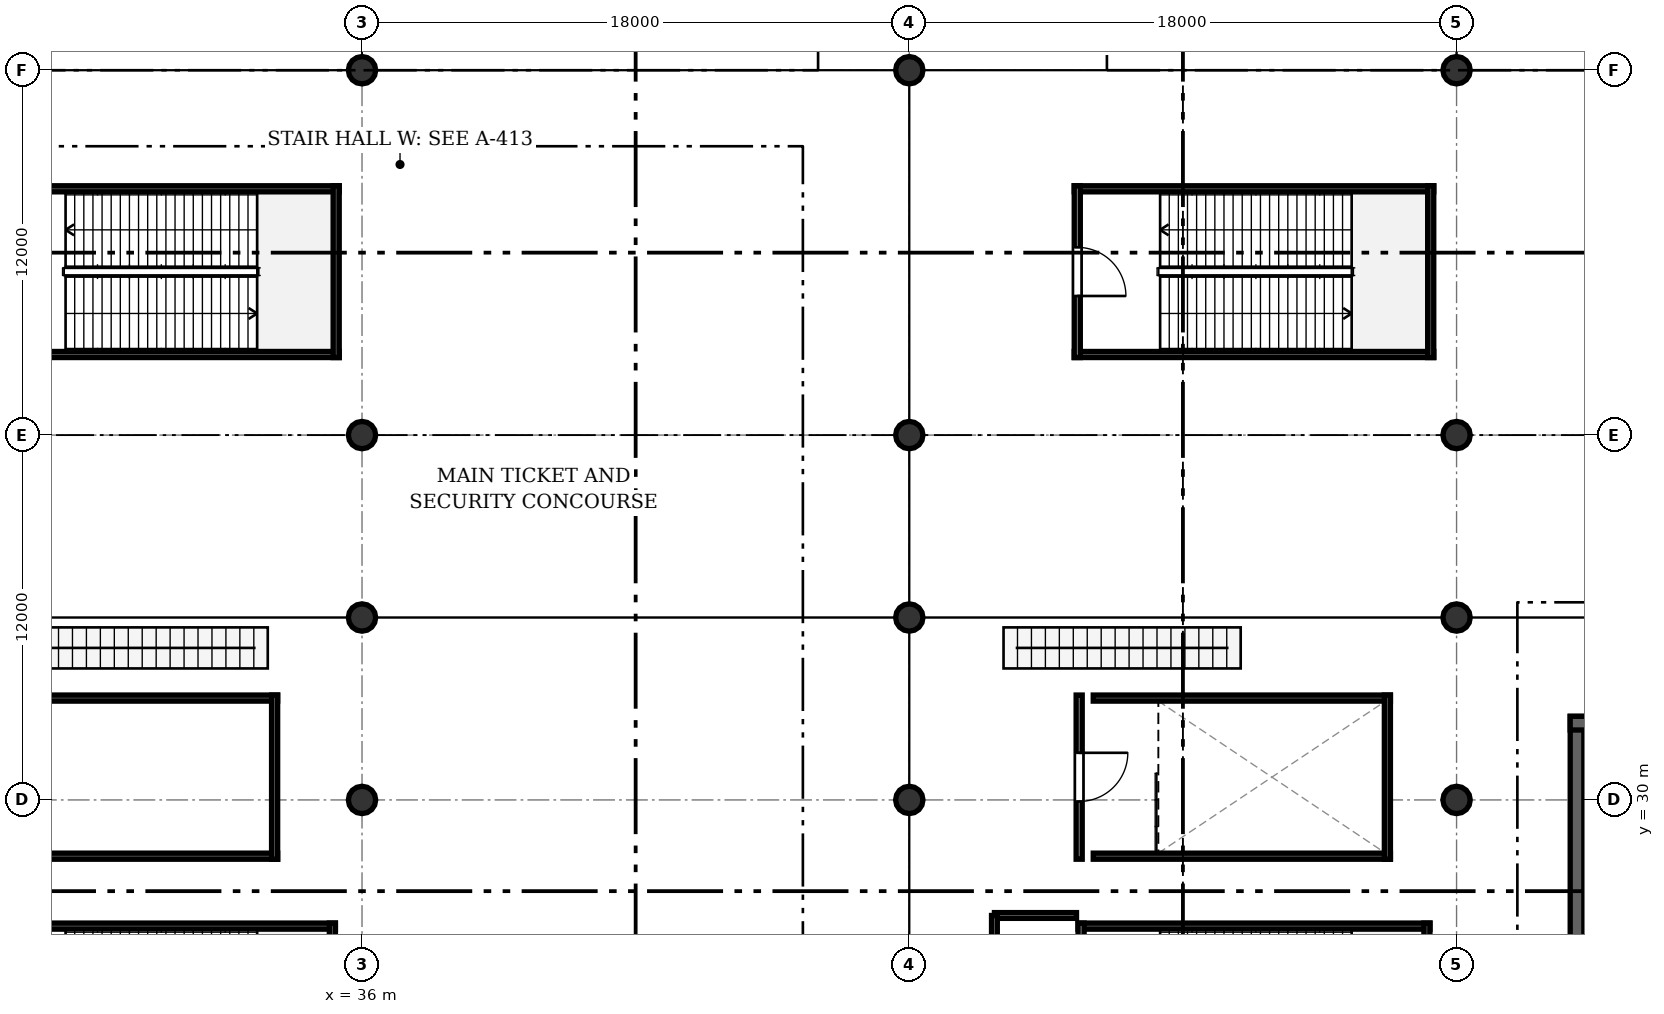
"""IFC4 building model, lengths in metres.
Left out: names, types, materials, properties, quantities, classifications, styles, units other than length and angle.
Written with IfcOpenShell. Run it as: python <this file> out.ifc"""

import sys

from ifc_helpers import new_model, si_unit, direction, frame, frame_2d, origin, origin_2d, place, context, subcontext, project, spatial, rectangle, circle, extrude, element, fill, save


model = new_model("IFC4")
c1 = context("Model", 3, precision=1e-05, world=origin(), true_north=direction((0.0, 1.0)))
c2 = subcontext(c1, "Body", "Model", "MODEL_VIEW")
j1 = project(units=[si_unit("LENGTHUNIT", "METRE"), si_unit("PLANEANGLEUNIT", "RADIAN")], contexts=[c1])
p1 = place(None, origin())
s1 = spatial("IfcSite", under=j1, at=p1, CompositionType="ELEMENT")
p2 = place(p1, origin())
s2 = spatial("IfcBuilding", under=s1, at=p2, CompositionType="ELEMENT")
p3 = place(p2, origin())
s3 = spatial("IfcBuildingStorey", under=s2, at=p3, CompositionType="ELEMENT", Elevation=0.0)
for number, where, z_axis, x_axis in (
    (1, (36.0, 30.0, 0.0), (0.0, 0.0, 1.0), (1.0, 0.0, 0.0)),
    (2, (36.0, 36.0, 0.0), (0.0, 0.0, 1.0), (1.0, 0.0, 0.0)),
    (3, (36.0, 42.0, 0.0), (0.0, 0.0, 1.0), (1.0, 0.0, 0.0)),
    (4, (36.0, 54.0, 0.0), (0.0, 0.0, 1.0), (1.0, 0.0, 0.0)),
    (5, (54.0, 30.0, 0.0), (0.0, 0.0, 1.0), (1.0, 0.0, 0.0)),
    (6, (54.0, 36.0, 0.0), (0.0, 0.0, 1.0), (1.0, 0.0, 0.0)),
    (7, (54.0, 42.0, 0.0), (0.0, 0.0, 1.0), (1.0, 0.0, 0.0)),
    (8, (54.0, 54.0, 0.0), (0.0, 0.0, 1.0), (1.0, 0.0, 0.0)),
    (9, (72.0, 30.0, 0.0), (0.0, 0.0, 1.0), (1.0, 0.0, 0.0)),
    (10, (72.0, 36.0, 0.0), (0.0, 0.0, 1.0), (1.0, 0.0, 0.0)),
    (11, (72.0, 42.0, 0.0), (0.0, 0.0, 1.0), (1.0, 0.0, 0.0)),
    (12, (72.0, 54.0, 0.0), (0.0, 0.0, 1.0), (1.0, 0.0, 0.0)),
):
    element("IfcColumn", number, at=place(p3, frame(where, z_axis=z_axis, x_axis=x_axis)), inside=s3, PredefinedType="COLUMN", context=c2, shape_type="SweptSolid", body=[
        extrude(circle(Radius=0.45, at=origin_2d()), origin(), (0.0, 0.0, 1.0), 6.6),
    ])
p4 = place(p3, frame((75.962, 32.75, 0.0), z_axis=(0.0, 0.0, 1.0), x_axis=(0.0, -1.0, 0.0)))
e13 = element("IfcWall", 13, at=p4, inside=s3, PredefinedType="SHEAR", context=c2, shape_type="SweptSolid", body=[
    extrude(rectangle(XDim=11.075, YDim=0.45, at=frame_2d((5.538, 0.0))), origin(), (0.0, 0.0, 1.0), 6.32),
])
p5 = place(p3, frame((80.637, 32.525, 0.0), z_axis=(0.0, 0.0, 1.0), x_axis=(-1.0, 0.0, 0.0)))
e14 = element("IfcWall", 14, at=p5, inside=s3, PredefinedType="SHEAR", context=c2, shape_type="SweptSolid", body=[
    extrude(rectangle(XDim=4.9, YDim=0.45, at=frame_2d((2.45, 0.0))), origin(), (0.0, 0.0, 1.0), 6.32),
])
p6 = place(p3, frame((35.125, 25.85, 0.0), z_axis=(0.0, 0.0, 1.0), x_axis=(-1.0, 0.0, 0.0)))
e15 = element("IfcWall", 15, at=p6, inside=s3, PredefinedType="SOLIDWALL", context=c2, shape_type="SweptSolid", body=[
    extrude(rectangle(XDim=11.575, YDim=0.2, at=frame_2d((5.788, 0.0))), origin(), (0.0, 0.0, 1.0), 6.32),
])
p7 = place(p3, frame((35.025, 20.55, 0.0), z_axis=(0.0, 0.0, 1.0), x_axis=(0.0, 1.0, 0.0)))
e16 = element("IfcWall", 16, at=p7, inside=s3, PredefinedType="SOLIDWALL", context=c2, shape_type="SweptSolid", body=[
    extrude(rectangle(XDim=5.4, YDim=0.2, at=frame_2d((2.7, 0.0))), origin(), (0.0, 0.0, 1.0), 6.32),
])
p8 = place(p3, frame((71.125, 25.85, 0.0), z_axis=(0.0, 0.0, 1.0), x_axis=(-1.0, 0.0, 0.0)))
e17 = element("IfcWall", 17, at=p8, inside=s3, PredefinedType="SOLIDWALL", context=c2, shape_type="SweptSolid", body=[
    extrude(rectangle(XDim=11.575, YDim=0.2, at=frame_2d((5.788, 0.0))), origin(), (0.0, 0.0, 1.0), 6.32),
])
p9 = place(p3, frame((71.025, 20.55, 0.0), z_axis=(0.0, 0.0, 1.0), x_axis=(0.0, 1.0, 0.0)))
e18 = element("IfcWall", 18, at=p9, inside=s3, PredefinedType="SOLIDWALL", context=c2, shape_type="SweptSolid", body=[
    extrude(rectangle(XDim=5.4, YDim=0.2, at=frame_2d((2.7, 0.0))), origin(), (0.0, 0.0, 1.0), 6.32),
])
p10 = place(p3, frame((59.65, 25.95, 0.0), z_axis=(0.0, 0.0, 1.0), x_axis=(0.0, -1.0, 0.0)))
e19 = element("IfcWall", 19, at=p10, inside=s3, PredefinedType="SOLIDWALL", context=c2, shape_type="SweptSolid", body=[
    extrude(rectangle(XDim=5.4, YDim=0.2, at=frame_2d((2.7, 0.0))), origin(), (0.0, 0.0, 1.0), 4.4),
])
p11 = place(p10, frame((1.9, 0.0, 0.0)))
e20 = element("IfcOpeningElement", 20, at=p11, cuts=e19, PredefinedType="OPENING", context=c2, shape_type="SweptSolid", body=[
    extrude(rectangle(XDim=1.6, YDim=2.15, at=frame_2d((0.8, 1.075))), frame((0.0, 0.11, 0.0), z_axis=(0.0, -1.0, 0.0), x_axis=(1.0, 0.0, 0.0)), (0.0, 0.0, 1.0), 0.22),
])
for number, where, z_axis, x_axis in (
    (21, (23.425, 44.65, 0.0), (0.0, 0.0, 1.0), (1.0, 0.0, 0.0)),
    (22, (35.25, 50.1, 0.0), (0.0, 0.0, 1.0), (-1.0, 0.0, 0.0)),
):
    element("IfcWall", number, at=place(p3, frame(where, z_axis=z_axis, x_axis=x_axis)), inside=s3, PredefinedType="SOLIDWALL", context=c2, shape_type="SweptSolid", body=[
        extrude(rectangle(XDim=11.825, YDim=0.2, at=frame_2d((5.913, 0.0))), origin(), (0.0, 0.0, 1.0), 6.32),
    ])
p12 = place(p3, frame((35.15, 44.55, 0.0), z_axis=(0.0, 0.0, 1.0), x_axis=(0.0, 1.0, 0.0)))
e23 = element("IfcWall", 23, at=p12, inside=s3, PredefinedType="SOLIDWALL", context=c2, shape_type="SweptSolid", body=[
    extrude(rectangle(XDim=5.65, YDim=0.2, at=frame_2d((2.825, 0.0))), origin(), (0.0, 0.0, 1.0), 6.32),
])
for number, where, z_axis, x_axis in (
    (24, (59.425, 44.65, 0.0), (0.0, 0.0, 1.0), (1.0, 0.0, 0.0)),
    (25, (71.25, 50.1, 0.0), (0.0, 0.0, 1.0), (-1.0, 0.0, 0.0)),
):
    element("IfcWall", number, at=place(p3, frame(where, z_axis=z_axis, x_axis=x_axis)), inside=s3, PredefinedType="SOLIDWALL", context=c2, shape_type="SweptSolid", body=[
        extrude(rectangle(XDim=11.825, YDim=0.2, at=frame_2d((5.913, 0.0))), origin(), (0.0, 0.0, 1.0), 6.32),
    ])
p13 = place(p3, frame((71.15, 44.55, 0.0), z_axis=(0.0, 0.0, 1.0), x_axis=(0.0, 1.0, 0.0)))
e26 = element("IfcWall", 26, at=p13, inside=s3, PredefinedType="SOLIDWALL", context=c2, shape_type="SweptSolid", body=[
    extrude(rectangle(XDim=5.65, YDim=0.2, at=frame_2d((2.825, 0.0))), origin(), (0.0, 0.0, 1.0), 6.32),
])
p14 = place(p3, frame((59.525, 50.2, 0.0), z_axis=(0.0, 0.0, 1.0), x_axis=(0.0, -1.0, 0.0)))
e27 = element("IfcWall", 27, at=p14, inside=s3, PredefinedType="SOLIDWALL", context=c2, shape_type="SweptSolid", body=[
    extrude(rectangle(XDim=5.65, YDim=0.2, at=frame_2d((2.825, 0.0))), origin(), (0.0, 0.0, 1.0), 4.4),
])
p15 = place(p14, frame((2.025, 0.0, 0.0)))
e28 = element("IfcOpeningElement", 28, at=p15, cuts=e27, PredefinedType="OPENING", context=c2, shape_type="SweptSolid", body=[
    extrude(rectangle(XDim=1.6, YDim=2.15, at=frame_2d((0.8, 1.075))), frame((0.0, 0.11, 0.0), z_axis=(0.0, -1.0, 0.0), x_axis=(1.0, 0.0, 0.0)), (0.0, 0.0, 1.0), 0.22),
])
for number, where, z_axis, x_axis in (
    (29, (24.05, 28.15, 0.0), (0.0, 0.0, 1.0), (1.0, 0.0, 0.0)),
    (30, (33.225, 33.35, 0.0), (0.0, 0.0, 1.0), (-1.0, 0.0, 0.0)),
):
    element("IfcWall", number, at=place(p3, frame(where, z_axis=z_axis, x_axis=x_axis)), inside=s3, PredefinedType="SOLIDWALL", context=c2, shape_type="SweptSolid", body=[
        extrude(rectangle(XDim=9.175, YDim=0.2, at=frame_2d((4.587, 0.0))), origin(), (0.0, 0.0, 1.0), 6.32),
    ])
p16 = place(p3, frame((33.125, 28.05, 0.0), z_axis=(0.0, 0.0, 1.0), x_axis=(0.0, 1.0, 0.0)))
e31 = element("IfcWall", 31, at=p16, inside=s3, PredefinedType="SOLIDWALL", context=c2, shape_type="SweptSolid", body=[
    extrude(rectangle(XDim=5.4, YDim=0.2, at=frame_2d((2.7, 0.0))), origin(), (0.0, 0.0, 1.0), 6.32),
])
for number, where, z_axis, x_axis in (
    (32, (60.05, 28.15, 0.0), (0.0, 0.0, 1.0), (1.0, 0.0, 0.0)),
    (33, (69.825, 33.35, 0.0), (0.0, 0.0, 1.0), (-1.0, 0.0, 0.0)),
):
    element("IfcWall", number, at=place(p3, frame(where, z_axis=z_axis, x_axis=x_axis)), inside=s3, PredefinedType="SOLIDWALL", context=c2, shape_type="SweptSolid", body=[
        extrude(rectangle(XDim=9.775, YDim=0.2, at=frame_2d((4.887, 0.0))), origin(), (0.0, 0.0, 1.0), 6.32),
    ])
p17 = place(p3, frame((69.725, 28.05, 0.0), z_axis=(0.0, 0.0, 1.0), x_axis=(0.0, 1.0, 0.0)))
e34 = element("IfcWall", 34, at=p17, inside=s3, PredefinedType="SOLIDWALL", context=c2, shape_type="SweptSolid", body=[
    extrude(rectangle(XDim=5.4, YDim=0.2, at=frame_2d((2.7, 0.0))), origin(), (0.0, 0.0, 1.0), 6.32),
])
p18 = place(p3, frame((59.587, 33.45, 0.0), z_axis=(0.0, 0.0, 1.0), x_axis=(0.0, -1.0, 0.0)))
e35 = element("IfcWall", 35, at=p18, inside=s3, PredefinedType="SOLIDWALL", context=c2, shape_type="SweptSolid", body=[
    extrude(rectangle(XDim=5.4, YDim=0.2, at=frame_2d((2.7, 0.0))), origin(), (0.0, 0.0, 1.0), 4.4),
])
p19 = place(p18, frame((1.9, 0.0, 0.0)))
e36 = element("IfcOpeningElement", 36, at=p19, cuts=e35, PredefinedType="OPENING", context=c2, shape_type="SweptSolid", body=[
    extrude(rectangle(XDim=1.6, YDim=2.15, at=frame_2d((0.8, 1.075))), frame((0.0, 0.11, 0.0), z_axis=(0.0, -1.0, 0.0), x_axis=(1.0, 0.0, 0.0)), (0.0, 0.0, 1.0), 0.22),
])
p20 = place(p3, frame((56.8, 26.2, 0.0), z_axis=(0.0, 0.0, 1.0), x_axis=(1.0, 0.0, 0.0)))
e37 = element("IfcWall", 37, at=p20, inside=s3, PredefinedType="PARTITIONING", context=c2, shape_type="SweptSolid", body=[
    extrude(rectangle(XDim=2.7, YDim=0.19, at=frame_2d((1.35, 0.0))), origin(), (0.0, 0.0, 1.0), 4.4),
])
p21 = place(p3, frame((56.8, 18.4, 0.0), z_axis=(0.0, 0.0, 1.0), x_axis=(0.0, 1.0, 0.0)))
e38 = element("IfcWall", 38, at=p21, inside=s3, PredefinedType="PARTITIONING", context=c2, shape_type="SweptSolid", body=[
    extrude(rectangle(XDim=7.8, YDim=0.19, at=frame_2d((3.9, 0.0))), origin(), (0.0, 0.0, 1.0), 4.4),
])
p22 = place(p21, frame((3.15, 0.0, 0.0)))
e39 = element("IfcOpeningElement", 39, at=p22, cuts=e38, PredefinedType="OPENING", context=c2, shape_type="SweptSolid", body=[
    extrude(rectangle(XDim=1.5, YDim=2.15, at=frame_2d((0.75, 1.075))), frame((0.0, 0.105, 0.0), z_axis=(0.0, -1.0, 0.0), x_axis=(1.0, 0.0, 0.0)), (0.0, 0.0, 1.0), 0.21),
])
p23 = place(p15, origin())
e40 = element("IfcDoor", 40, at=p23, inside=s3, OperationType="SINGLE_SWING_RIGHT", PredefinedType="DOOR", context=c2, shape_type="SweptSolid", body=[
    extrude(rectangle(XDim=1.6, YDim=2.15, at=frame_2d((0.8, 1.075))), frame((0.0, 0.025, 0.0), z_axis=(0.0, -1.0, 0.0), x_axis=(1.0, 0.0, 0.0)), (0.0, 0.0, 1.0), 0.05),
])
fill(e28, e40)
p24 = place(p19, origin())
e41 = element("IfcDoor", 41, at=p24, inside=s3, OperationType="SINGLE_SWING_LEFT", PredefinedType="DOOR", context=c2, shape_type="SweptSolid", body=[
    extrude(rectangle(XDim=1.6, YDim=2.15, at=frame_2d((0.8, 1.075))), frame((0.0, 0.025, 0.0), z_axis=(0.0, -1.0, 0.0), x_axis=(1.0, 0.0, 0.0)), (0.0, 0.0, 1.0), 0.05),
])
fill(e36, e41)
save(model, sys.argv[1])
